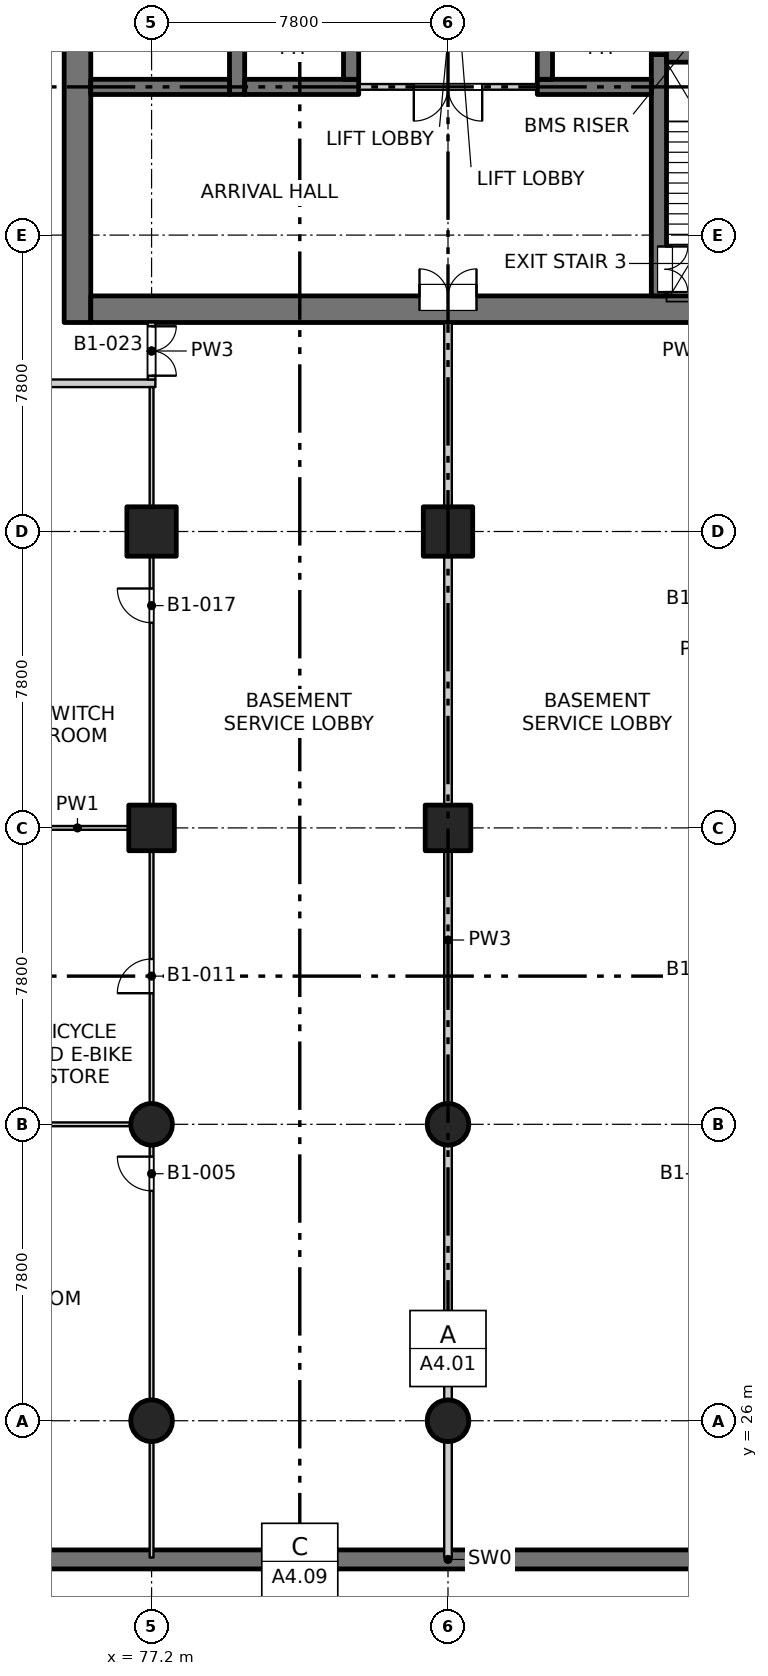
"""IFC4 building model, lengths in metres.
Left out: names, types, materials, properties, quantities, classifications, styles, units other than length and angle.
Written with IfcOpenShell. Run it as: python <this file> out.ifc"""

import sys

from ifc_helpers import new_model, si_unit, direction, frame, frame_2d, origin, origin_2d, place, context, subcontext, project, spatial, rectangle, circle, extrude, element, fill, save


model = new_model("IFC4")
c1 = context("Model", 3, precision=1e-05, world=origin(), true_north=direction((0.0, 1.0)))
c2 = subcontext(c1, "Body", "Model", "MODEL_VIEW")
j1 = project(units=[si_unit("LENGTHUNIT", "METRE"), si_unit("PLANEANGLEUNIT", "RADIAN")], contexts=[c1])
p1 = place(None, origin())
s1 = spatial("IfcSite", under=j1, at=p1, CompositionType="ELEMENT")
p2 = place(p1, origin())
s2 = spatial("IfcBuilding", under=s1, at=p2, CompositionType="ELEMENT")
p3 = place(p2, frame((0.0, 0.0, -4.5)))
s3 = spatial("IfcBuildingStorey", under=s2, at=p3, CompositionType="ELEMENT", Elevation=-4.5)
p4 = place(p3, frame((42.6, 22.35, -0.35), z_axis=(0.0, 0.0, 1.0), x_axis=(1.0, 0.0, 0.0)))
e1 = element("IfcWall", 1, at=p4, inside=s3, PredefinedType="SOLIDWALL", context=c2, shape_type="SweptSolid", body=[
    extrude(rectangle(XDim=84.8, YDim=0.5, at=frame_2d((42.4, 0.0))), origin(), (0.0, 0.0, 1.0), 4.45),
])
for number, where, z_axis, x_axis in (
    (2, (77.2, 41.6, -0.35), (0.0, 0.0, 1.0), (1.0, 0.0, 0.0)),
    (3, (85.0, 41.6, -0.35), (0.0, 0.0, 1.0), (1.0, 0.0, 0.0)),
):
    element("IfcColumn", number, at=place(p3, frame(where, z_axis=z_axis, x_axis=x_axis)), inside=s3, PredefinedType="COLUMN", context=c2, shape_type="SweptSolid", body=[
        extrude(rectangle(XDim=1.2, YDim=1.2, at=origin_2d()), origin(), (0.0, 0.0, 1.0), 4.45),
    ])
for number, where, z_axis, x_axis in (
    (4, (77.2, 49.4, -0.35), (0.0, 0.0, 1.0), (1.0, 0.0, 0.0)),
    (5, (85.0, 49.4, -0.35), (0.0, 0.0, 1.0), (1.0, 0.0, 0.0)),
):
    element("IfcColumn", number, at=place(p3, frame(where, z_axis=z_axis, x_axis=x_axis)), inside=s3, PredefinedType="COLUMN", context=c2, shape_type="SweptSolid", body=[
        extrude(rectangle(XDim=1.3, YDim=1.3, at=origin_2d()), origin(), (0.0, 0.0, 1.0), 4.45),
    ])
for number, where, z_axis, x_axis in (
    (6, (77.2, 26.0, -0.35), (0.0, 0.0, 1.0), (1.0, 0.0, 0.0)),
    (7, (77.2, 33.8, -0.35), (0.0, 0.0, 1.0), (1.0, 0.0, 0.0)),
    (8, (85.0, 26.0, -0.35), (0.0, 0.0, 1.0), (1.0, 0.0, 0.0)),
    (9, (85.0, 33.8, -0.35), (0.0, 0.0, 1.0), (1.0, 0.0, 0.0)),
):
    element("IfcColumn", number, at=place(p3, frame(where, z_axis=z_axis, x_axis=x_axis)), inside=s3, PredefinedType="COLUMN", context=c2, shape_type="SweptSolid", body=[
        extrude(circle(Radius=0.55, at=origin_2d()), origin(), (0.0, 0.0, 1.0), 4.45),
    ])
p5 = place(p3, frame((75.25, 54.9, -0.35), z_axis=(0.0, 0.0, 1.0), x_axis=(0.0, 1.0, 0.0)))
e10 = element("IfcWall", 10, at=p5, inside=s3, PredefinedType="SOLIDWALL", context=c2, shape_type="SweptSolid", body=[
    extrude(rectangle(XDim=22.4, YDim=0.7, at=frame_2d((11.2, 0.0))), origin(), (0.0, 0.0, 1.0), 4.45),
])
p6 = place(p5, frame((7.55, 0.0, 0.35)))
e11 = element("IfcOpeningElement", 11, at=p6, cuts=e10, PredefinedType="OPENING", context=c2, shape_type="SweptSolid", body=[
    extrude(rectangle(XDim=0.9, YDim=2.1, at=frame_2d((0.45, 1.05))), frame((0.0, 0.36, 0.0), z_axis=(0.0, -1.0, 0.0), x_axis=(1.0, 0.0, 0.0)), (0.0, 0.0, 1.0), 0.72),
])
p7 = place(p5, frame((10.85, 0.0, 0.35)))
e12 = element("IfcOpeningElement", 12, at=p7, cuts=e10, PredefinedType="OPENING", context=c2, shape_type="SweptSolid", body=[
    extrude(rectangle(XDim=0.9, YDim=2.1, at=frame_2d((0.45, 1.05))), frame((0.0, 0.36, 0.0), z_axis=(0.0, -1.0, 0.0), x_axis=(1.0, 0.0, 0.0)), (0.0, 0.0, 1.0), 0.72),
])
p8 = place(p5, frame((13.85, 0.0, 0.35)))
e13 = element("IfcOpeningElement", 13, at=p8, cuts=e10, PredefinedType="OPENING", context=c2, shape_type="SweptSolid", body=[
    extrude(rectangle(XDim=0.9, YDim=2.1, at=frame_2d((0.45, 1.05))), frame((0.0, 0.36, 0.0), z_axis=(0.0, -1.0, 0.0), x_axis=(1.0, 0.0, 0.0)), (0.0, 0.0, 1.0), 0.72),
])
p9 = place(p5, frame((16.85, 0.0, 0.35)))
e14 = element("IfcOpeningElement", 14, at=p9, cuts=e10, PredefinedType="OPENING", context=c2, shape_type="SweptSolid", body=[
    extrude(rectangle(XDim=0.9, YDim=2.1, at=frame_2d((0.45, 1.05))), frame((0.0, 0.36, 0.0), z_axis=(0.0, -1.0, 0.0), x_axis=(1.0, 0.0, 0.0)), (0.0, 0.0, 1.0), 0.72),
])
p10 = place(p5, frame((20.15, 0.0, 0.35)))
e15 = element("IfcOpeningElement", 15, at=p10, cuts=e10, PredefinedType="OPENING", context=c2, shape_type="SweptSolid", body=[
    extrude(rectangle(XDim=0.9, YDim=2.1, at=frame_2d((0.45, 1.05))), frame((0.0, 0.36, 0.0), z_axis=(0.0, -1.0, 0.0), x_axis=(1.0, 0.0, 0.0)), (0.0, 0.0, 1.0), 0.72),
])
p11 = place(p3, frame((75.6, 55.25, -0.35), z_axis=(0.0, 0.0, 1.0), x_axis=(1.0, 0.0, 0.0)))
e16 = element("IfcWall", 16, at=p11, inside=s3, PredefinedType="SOLIDWALL", context=c2, shape_type="SweptSolid", body=[
    extrude(rectangle(XDim=18.8, YDim=0.7, at=frame_2d((9.4, 0.0))), origin(), (0.0, 0.0, 1.0), 4.45),
])
p12 = place(p11, frame((8.65, 0.0, 0.35)))
e17 = element("IfcOpeningElement", 17, at=p12, cuts=e16, PredefinedType="OPENING", context=c2, shape_type="SweptSolid", body=[
    extrude(rectangle(XDim=1.5, YDim=2.1, at=frame_2d((0.75, 1.05))), frame((0.0, 0.36, 0.0), z_axis=(0.0, -1.0, 0.0), x_axis=(1.0, 0.0, 0.0)), (0.0, 0.0, 1.0), 0.72),
])
p13 = place(p3, frame((79.45, 60.9, -0.35), z_axis=(0.0, 0.0, 1.0), x_axis=(0.0, 1.0, 0.0)))
e18 = element("IfcWall", 18, at=p13, inside=s3, PredefinedType="SOLIDWALL", context=c2, shape_type="SweptSolid", body=[
    extrude(rectangle(XDim=16.4, YDim=0.4, at=frame_2d((8.2, 0.0))), origin(), (0.0, 0.0, 1.0), 4.45),
])
p14 = place(p3, frame((90.55, 55.6, -0.35), z_axis=(0.0, 0.0, 1.0), x_axis=(0.0, 1.0, 0.0)))
e19 = element("IfcWall", 19, at=p14, inside=s3, PredefinedType="SOLIDWALL", context=c2, shape_type="SweptSolid", body=[
    extrude(rectangle(XDim=6.35, YDim=0.4, at=frame_2d((3.175, 0.0))), origin(), (0.0, 0.0, 1.0), 4.45),
])
p15 = place(p14, frame((0.1, 0.0, 0.35)))
e20 = element("IfcOpeningElement", 20, at=p15, cuts=e19, PredefinedType="OPENING", context=c2, shape_type="SweptSolid", body=[
    extrude(rectangle(XDim=1.2, YDim=2.1, at=frame_2d((0.6, 1.05))), frame((0.0, 0.21, 0.0), z_axis=(0.0, -1.0, 0.0), x_axis=(1.0, 0.0, 0.0)), (0.0, 0.0, 1.0), 0.42),
])
p16 = place(p3, frame((90.55, 61.95, -0.35), z_axis=(0.0, 0.0, 1.0), x_axis=(0.0, 1.0, 0.0)))
e21 = element("IfcWall", 21, at=p16, inside=s3, PredefinedType="SOLIDWALL", context=c2, shape_type="SweptSolid", body=[
    extrude(rectangle(XDim=15.35, YDim=0.4, at=frame_2d((7.675, 0.0))), origin(), (0.0, 0.0, 1.0), 4.45),
])
p17 = place(p3, frame((79.65, 61.1, -0.35), z_axis=(0.0, 0.0, 1.0), x_axis=(1.0, 0.0, 0.0)))
e22 = element("IfcWall", 22, at=p17, inside=s3, PredefinedType="SOLIDWALL", context=c2, shape_type="SweptSolid", body=[
    extrude(rectangle(XDim=3.0, YDim=0.4, at=frame_2d((1.5, 0.0))), origin(), (0.0, 0.0, 1.0), 4.45),
])
p18 = place(p3, frame((82.45, 61.3, -0.35), z_axis=(0.0, 0.0, 1.0), x_axis=(0.0, 1.0, 0.0)))
e23 = element("IfcWall", 23, at=p18, inside=s3, PredefinedType="SOLIDWALL", context=c2, shape_type="SweptSolid", body=[
    extrude(rectangle(XDim=2.2, YDim=0.4, at=frame_2d((1.1, 0.0))), origin(), (0.0, 0.0, 1.0), 4.45),
])
p19 = place(p3, frame((87.35, 61.1, -0.35), z_axis=(0.0, 0.0, 1.0), x_axis=(1.0, 0.0, 0.0)))
e24 = element("IfcWall", 24, at=p19, inside=s3, PredefinedType="SOLIDWALL", context=c2, shape_type="SweptSolid", body=[
    extrude(rectangle(XDim=3.0, YDim=0.4, at=frame_2d((1.5, 0.0))), origin(), (0.0, 0.0, 1.0), 4.45),
])
p20 = place(p3, frame((87.55, 61.3, -0.35), z_axis=(0.0, 0.0, 1.0), x_axis=(0.0, 1.0, 0.0)))
e25 = element("IfcWall", 25, at=p20, inside=s3, PredefinedType="SOLIDWALL", context=c2, shape_type="SweptSolid", body=[
    extrude(rectangle(XDim=2.2, YDim=0.4, at=frame_2d((1.1, 0.0))), origin(), (0.0, 0.0, 1.0), 4.45),
])
for number, where, z_axis, x_axis in (
    (26, (75.6, 61.1, -0.35), (0.0, 0.0, 1.0), (1.0, 0.0, 0.0)),
    (27, (90.75, 61.95, -0.35), (0.0, 0.0, 1.0), (1.0, 0.0, 0.0)),
):
    element("IfcWall", number, at=place(p3, frame(where, z_axis=z_axis, x_axis=x_axis)), inside=s3, PredefinedType="SOLIDWALL", context=c2, shape_type="SweptSolid", body=[
        extrude(rectangle(XDim=3.65, YDim=0.4, at=frame_2d((1.825, 0.0))), origin(), (0.0, 0.0, 1.0), 4.45),
    ])
p21 = place(p3, frame((59.75, 33.8, 0.0), z_axis=(0.0, 0.0, 1.0), x_axis=(1.0, 0.0, 0.0)))
e28 = element("IfcWall", 28, at=p21, inside=s3, PredefinedType="PARTITIONING", context=c2, shape_type="SweptSolid", body=[
    extrude(rectangle(XDim=17.5, YDim=0.1, at=frame_2d((8.75, 0.0))), origin(), (0.0, 0.0, 1.0), 4.1),
])
p22 = place(p3, frame((73.25, 41.6, 0.0), z_axis=(0.0, 0.0, 1.0), x_axis=(1.0, 0.0, 0.0)))
e29 = element("IfcWall", 29, at=p22, inside=s3, PredefinedType="PARTITIONING", context=c2, shape_type="SweptSolid", body=[
    extrude(rectangle(XDim=4.0, YDim=0.1, at=frame_2d((2.0, 0.0))), origin(), (0.0, 0.0, 1.0), 4.1),
])
p23 = place(p3, frame((59.55, 53.3, 0.0), z_axis=(0.0, 0.0, 1.0), x_axis=(1.0, 0.0, 0.0)))
e30 = element("IfcWall", 30, at=p23, inside=s3, PredefinedType="PARTITIONING", context=c2, shape_type="SweptSolid", body=[
    extrude(rectangle(XDim=17.75, YDim=0.2, at=frame_2d((8.875, 0.0))), origin(), (0.0, 0.0, 1.0), 4.1),
])
p24 = place(p3, frame((82.65, 61.1, 0.0), z_axis=(0.0, 0.0, 1.0), x_axis=(1.0, 0.0, 0.0)))
e31 = element("IfcWall", 31, at=p24, inside=s3, PredefinedType="PARTITIONING", context=c2, shape_type="SweptSolid", body=[
    extrude(rectangle(XDim=4.7, YDim=0.15, at=frame_2d((2.35, 0.0))), origin(), (0.0, 0.0, 1.0), 4.1),
])
p25 = place(p24, frame((1.45, 0.0, 0.0)))
e32 = element("IfcOpeningElement", 32, at=p25, cuts=e31, PredefinedType="OPENING", context=c2, shape_type="SweptSolid", body=[
    extrude(rectangle(XDim=1.8, YDim=2.1, at=frame_2d((0.9, 1.05))), frame((0.0, 0.085, 0.0), z_axis=(0.0, -1.0, 0.0), x_axis=(1.0, 0.0, 0.0)), (0.0, 0.0, 1.0), 0.17),
])
p26 = place(p3, frame((77.2, 22.4, 0.0), z_axis=(0.0, 0.0, 1.0), x_axis=(0.0, 1.0, 0.0)))
e33 = element("IfcWall", 33, at=p26, inside=s3, PredefinedType="PARTITIONING", context=c2, shape_type="SweptSolid", body=[
    extrude(rectangle(XDim=30.8, YDim=0.1, at=frame_2d((15.4, 0.0))), origin(), (0.0, 0.0, 1.0), 4.1),
])
p27 = place(p26, frame((9.65, 0.0, 0.0)))
e34 = element("IfcOpeningElement", 34, at=p27, cuts=e33, PredefinedType="OPENING", context=c2, shape_type="SweptSolid", body=[
    extrude(rectangle(XDim=0.9, YDim=2.1, at=frame_2d((0.45, 1.05))), frame((0.0, 0.06, 0.0), z_axis=(0.0, -1.0, 0.0), x_axis=(1.0, 0.0, 0.0)), (0.0, 0.0, 1.0), 0.12),
])
p28 = place(p26, frame((14.85, 0.0, 0.0)))
e35 = element("IfcOpeningElement", 35, at=p28, cuts=e33, PredefinedType="OPENING", context=c2, shape_type="SweptSolid", body=[
    extrude(rectangle(XDim=0.9, YDim=2.1, at=frame_2d((0.45, 1.05))), frame((0.0, 0.06, 0.0), z_axis=(0.0, -1.0, 0.0), x_axis=(1.0, 0.0, 0.0)), (0.0, 0.0, 1.0), 0.12),
])
p29 = place(p26, frame((24.6, 0.0, 0.0)))
e36 = element("IfcOpeningElement", 36, at=p29, cuts=e33, PredefinedType="OPENING", context=c2, shape_type="SweptSolid", body=[
    extrude(rectangle(XDim=0.9, YDim=2.1, at=frame_2d((0.45, 1.05))), frame((0.0, 0.06, 0.0), z_axis=(0.0, -1.0, 0.0), x_axis=(1.0, 0.0, 0.0)), (0.0, 0.0, 1.0), 0.12),
])
p30 = place(p3, frame((77.2, 53.4, 0.0), z_axis=(0.0, 0.0, 1.0), x_axis=(0.0, 1.0, 0.0)))
e37 = element("IfcWall", 37, at=p30, inside=s3, PredefinedType="PARTITIONING", context=c2, shape_type="SweptSolid", body=[
    extrude(rectangle(XDim=1.5, YDim=0.2, at=frame_2d((0.75, 0.0))), origin(), (0.0, 0.0, 1.0), 4.1),
])
p31 = place(p30, frame((0.1, 0.0, 0.0)))
e38 = element("IfcOpeningElement", 38, at=p31, cuts=e37, PredefinedType="OPENING", context=c2, shape_type="SweptSolid", body=[
    extrude(rectangle(XDim=1.3, YDim=2.1, at=frame_2d((0.65, 1.05))), frame((0.0, 0.11, 0.0), z_axis=(0.0, -1.0, 0.0), x_axis=(1.0, 0.0, 0.0)), (0.0, 0.0, 1.0), 0.22),
])
p32 = place(p3, frame((85.0, 22.4, 0.0), z_axis=(0.0, 0.0, 1.0), x_axis=(0.0, 1.0, 0.0)))
e39 = element("IfcWall", 39, at=p32, inside=s3, PredefinedType="PARTITIONING", context=c2, shape_type="SweptSolid", body=[
    extrude(rectangle(XDim=32.5, YDim=0.2, at=frame_2d((16.25, 0.0))), origin(), (0.0, 0.0, 1.0), 4.1),
])
p33 = place(p27, origin())
e40 = element("IfcDoor", 40, at=p33, inside=s3, OperationType="SINGLE_SWING_RIGHT", PredefinedType="DOOR", context=c2, shape_type="SweptSolid", body=[
    extrude(rectangle(XDim=0.9, YDim=2.1, at=frame_2d((0.45, 1.05))), frame((0.0, 0.025, 0.0), z_axis=(0.0, -1.0, 0.0), x_axis=(1.0, 0.0, 0.0)), (0.0, 0.0, 1.0), 0.05),
])
fill(e34, e40)
p34 = place(p28, origin())
e41 = element("IfcDoor", 41, at=p34, inside=s3, OperationType="SINGLE_SWING_LEFT", PredefinedType="DOOR", context=c2, shape_type="SweptSolid", body=[
    extrude(rectangle(XDim=0.9, YDim=2.1, at=frame_2d((0.45, 1.05))), frame((0.0, 0.025, 0.0), z_axis=(0.0, -1.0, 0.0), x_axis=(1.0, 0.0, 0.0)), (0.0, 0.0, 1.0), 0.05),
])
fill(e35, e41)
p35 = place(p29, origin())
e42 = element("IfcDoor", 42, at=p35, inside=s3, OperationType="SINGLE_SWING_RIGHT", PredefinedType="DOOR", context=c2, shape_type="SweptSolid", body=[
    extrude(rectangle(XDim=0.9, YDim=2.1, at=frame_2d((0.45, 1.05))), frame((0.0, 0.025, 0.0), z_axis=(0.0, -1.0, 0.0), x_axis=(1.0, 0.0, 0.0)), (0.0, 0.0, 1.0), 0.05),
])
fill(e36, e42)
p36 = place(p31, origin())
e43 = element("IfcDoor", 43, at=p36, inside=s3, OperationType="DOUBLE_DOOR_SINGLE_SWING", PredefinedType="DOOR", context=c2, shape_type="SweptSolid", body=[
    extrude(rectangle(XDim=1.3, YDim=2.1, at=frame_2d((0.65, 1.05))), frame((0.0, 0.025, 0.0), z_axis=(0.0, -1.0, 0.0), x_axis=(1.0, 0.0, 0.0)), (0.0, 0.0, 1.0), 0.05),
])
fill(e38, e43)
p37 = place(p12, origin())
e44 = element("IfcDoor", 44, at=p37, inside=s3, OperationType="DOUBLE_DOOR_SINGLE_SWING", PredefinedType="DOOR", context=c2, shape_type="SweptSolid", body=[
    extrude(rectangle(XDim=1.5, YDim=2.1, at=frame_2d((0.75, 1.05))), frame((0.0, 0.335, 0.0), z_axis=(0.0, -1.0, 0.0), x_axis=(1.0, 0.0, 0.0)), (0.0, 0.0, 1.0), 0.05),
])
fill(e17, e44)
p38 = place(p15, origin())
e45 = element("IfcDoor", 45, at=p38, inside=s3, OperationType="DOUBLE_DOOR_SINGLE_SWING", PredefinedType="DOOR", context=c2, shape_type="SweptSolid", body=[
    extrude(rectangle(XDim=1.2, YDim=2.1, at=frame_2d((0.6, 1.05))), frame((0.0, -0.135, 0.0), z_axis=(0.0, -1.0, 0.0), x_axis=(1.0, 0.0, 0.0)), (0.0, 0.0, 1.0), 0.05),
])
fill(e20, e45)
p39 = place(p25, origin())
e46 = element("IfcDoor", 46, at=p39, inside=s3, OperationType="DOUBLE_DOOR_SINGLE_SWING", PredefinedType="DOOR", context=c2, shape_type="SweptSolid", body=[
    extrude(rectangle(XDim=1.8, YDim=2.1, at=frame_2d((0.9, 1.05))), frame((0.0, 0.025, 0.0), z_axis=(0.0, -1.0, 0.0), x_axis=(1.0, 0.0, 0.0)), (0.0, 0.0, 1.0), 0.05),
])
fill(e32, e46)
save(model, sys.argv[1])
